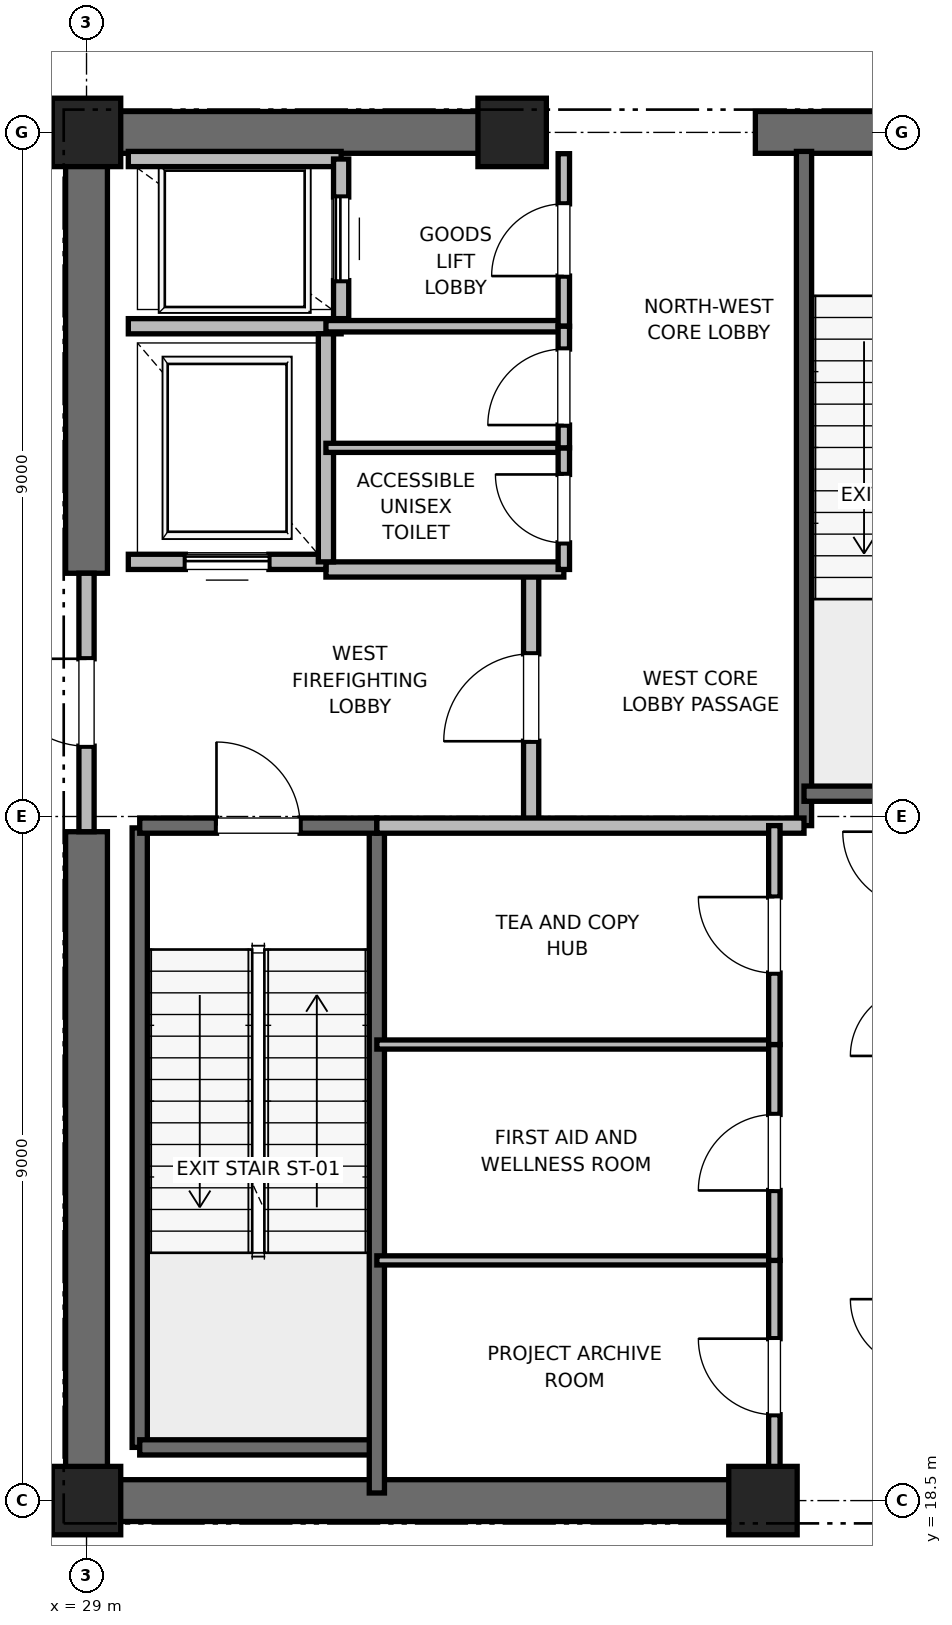
"""IFC4 building model, lengths in metres.
Left out: names, types, materials, properties, quantities, classifications, styles, units other than length and angle.
Written with IfcOpenShell. Run it as: python <this file> out.ifc"""

import sys

from ifc_helpers import new_model, si_unit, direction, frame, frame_2d, origin, origin_2d, place, context, subcontext, project, spatial, rectangle, extrude, element, fill, save


model = new_model("IFC4")
c1 = context("Model", 3, precision=1e-05, world=origin(), true_north=direction((0.0, 1.0)))
c2 = subcontext(c1, "Body", "Model", "MODEL_VIEW")
j1 = project(units=[si_unit("LENGTHUNIT", "METRE"), si_unit("PLANEANGLEUNIT", "RADIAN")], contexts=[c1])
p1 = place(None, origin())
s1 = spatial("IfcSite", under=j1, at=p1, CompositionType="ELEMENT")
p2 = place(p1, origin())
s2 = spatial("IfcBuilding", under=s1, at=p2, CompositionType="ELEMENT")
p3 = place(p2, frame((0.0, 0.0, 184.4)))
s3 = spatial("IfcBuildingStorey", under=s2, at=p3, CompositionType="ELEMENT", Elevation=184.4)
for number, where, z_axis, x_axis in (
    (1, (29.0, 18.5, 0.0), (0.0, 0.0, 1.0), (1.0, 0.0, 0.0)),
    (2, (29.0, 36.5, 0.0), (0.0, 0.0, 1.0), (1.0, 0.0, 0.0)),
    (3, (37.9, 18.5, 0.0), (0.0, 0.0, 1.0), (1.0, 0.0, 0.0)),
    (4, (34.6, 36.5, 0.0), (0.0, 0.0, 1.0), (1.0, 0.0, 0.0)),
):
    element("IfcColumn", number, at=place(p3, frame(where, z_axis=z_axis, x_axis=x_axis)), inside=s3, PredefinedType="PILASTER", context=c2, shape_type="SweptSolid", body=[
        extrude(rectangle(XDim=0.9, YDim=0.9, at=origin_2d()), origin(), (0.0, 0.0, 1.0), 5.0),
    ])
p4 = place(p3, frame((29.0, 18.5, 0.0), z_axis=(0.0, 0.0, 1.0), x_axis=(1.0, 0.0, 0.0)))
e5 = element("IfcWall", 5, at=p4, inside=s3, PredefinedType="SHEAR", context=c2, shape_type="SweptSolid", body=[
    extrude(rectangle(XDim=9.2, YDim=0.55, at=frame_2d((4.6, 0.0))), origin(), (0.0, 0.0, 1.0), 4.7),
])
p5 = place(p3, frame((29.0, 36.5, 0.0), z_axis=(0.0, 0.0, 1.0), x_axis=(1.0, 0.0, 0.0)))
e6 = element("IfcWall", 6, at=p5, inside=s3, PredefinedType="SHEAR", context=c2, shape_type="SweptSolid", body=[
    extrude(rectangle(XDim=5.8, YDim=0.55, at=frame_2d((2.9, 0.0))), origin(), (0.0, 0.0, 1.0), 4.7),
])
p6 = place(p3, frame((37.8, 36.5, 0.0), z_axis=(0.0, 0.0, 1.0), x_axis=(1.0, 0.0, 0.0)))
e7 = element("IfcWall", 7, at=p6, inside=s3, PredefinedType="SHEAR", context=c2, shape_type="SweptSolid", body=[
    extrude(rectangle(XDim=4.4, YDim=0.55, at=frame_2d((2.2, 0.0))), origin(), (0.0, 0.0, 1.0), 4.7),
])
p7 = place(p6, frame((1.65, 0.0, 0.0)))
e8 = element("IfcOpeningElement", 8, at=p7, cuts=e7, PredefinedType="OPENING", context=c2, shape_type="SweptSolid", body=[
    extrude(rectangle(XDim=1.1, YDim=2.15, at=frame_2d((0.55, 1.075))), frame((0.0, 0.275, 0.0), z_axis=(0.0, -1.0, 0.0), x_axis=(1.0, 0.0, 0.0)), (0.0, 0.0, 1.0), 0.55),
])
p8 = place(p3, frame((29.0, 18.5, 0.0), z_axis=(0.0, 0.0, 1.0), x_axis=(0.0, 1.0, 0.0)))
e9 = element("IfcWall", 9, at=p8, inside=s3, PredefinedType="SHEAR", context=c2, shape_type="SweptSolid", body=[
    extrude(rectangle(XDim=8.8, YDim=0.55, at=frame_2d((4.4, 0.0))), origin(), (0.0, 0.0, 1.0), 4.7),
])
p9 = place(p3, frame((29.0, 30.7, 0.0), z_axis=(0.0, 0.0, 1.0), x_axis=(0.0, 1.0, 0.0)))
e10 = element("IfcWall", 10, at=p9, inside=s3, PredefinedType="SHEAR", context=c2, shape_type="SweptSolid", body=[
    extrude(rectangle(XDim=5.8, YDim=0.55, at=frame_2d((2.9, 0.0))), origin(), (0.0, 0.0, 1.0), 4.7),
])
p10 = place(p3, frame((29.7, 19.2, 0.0), z_axis=(0.0, 0.0, 1.0), x_axis=(0.0, 1.0, 0.0)))
e11 = element("IfcWall", 11, at=p10, inside=s3, PredefinedType="SOLIDWALL", context=c2, shape_type="SweptSolid", body=[
    extrude(rectangle(XDim=8.15, YDim=0.2, at=frame_2d((4.075, 0.0))), origin(), (0.0, 0.0, 1.0), 4.7),
])
p11 = place(p3, frame((29.7, 19.2, 0.0), z_axis=(0.0, 0.0, 1.0), x_axis=(1.0, 0.0, 0.0)))
e12 = element("IfcWall", 12, at=p11, inside=s3, PredefinedType="SOLIDWALL", context=c2, shape_type="SweptSolid", body=[
    extrude(rectangle(XDim=3.12, YDim=0.2, at=frame_2d((1.56, 0.0))), origin(), (0.0, 0.0, 1.0), 4.7),
])
p12 = place(p3, frame((32.82, 18.6, 0.0), z_axis=(0.0, 0.0, 1.0), x_axis=(0.0, 1.0, 0.0)))
e13 = element("IfcWall", 13, at=p12, inside=s3, PredefinedType="SOLIDWALL", context=c2, shape_type="SweptSolid", body=[
    extrude(rectangle(XDim=8.78, YDim=0.2, at=frame_2d((4.39, 0.0))), origin(), (0.0, 0.0, 1.0), 4.7),
])
p13 = place(p3, frame((29.7, 27.38, 0.0), z_axis=(0.0, 0.0, 1.0), x_axis=(1.0, 0.0, 0.0)))
e14 = element("IfcWall", 14, at=p13, inside=s3, PredefinedType="SOLIDWALL", context=c2, shape_type="SweptSolid", body=[
    extrude(rectangle(XDim=3.12, YDim=0.2, at=frame_2d((1.56, 0.0))), origin(), (0.0, 0.0, 1.0), 4.7),
])
p14 = place(p13, frame((1.01, 0.0, 0.0)))
e15 = element("IfcOpeningElement", 15, at=p14, cuts=e14, PredefinedType="OPENING", context=c2, shape_type="SweptSolid", body=[
    extrude(rectangle(XDim=1.1, YDim=2.15, at=frame_2d((0.55, 1.075))), frame((0.0, 0.1, 0.0), z_axis=(0.0, -1.0, 0.0), x_axis=(1.0, 0.0, 0.0)), (0.0, 0.0, 1.0), 0.2),
])
p15 = place(p3, frame((38.44, 27.38, 0.0), z_axis=(0.0, 0.0, 1.0), x_axis=(0.0, 1.0, 0.0)))
e16 = element("IfcWall", 16, at=p15, inside=s3, PredefinedType="SOLIDWALL", context=c2, shape_type="SweptSolid", body=[
    extrude(rectangle(XDim=8.87, YDim=0.2, at=frame_2d((4.435, 0.0))), origin(), (0.0, 0.0, 1.0), 4.7),
])
p16 = place(p3, frame((38.44, 27.8, 0.0), z_axis=(0.0, 0.0, 1.0), x_axis=(1.0, 0.0, 0.0)))
e17 = element("IfcWall", 17, at=p16, inside=s3, PredefinedType="SOLIDWALL", context=c2, shape_type="SweptSolid", body=[
    extrude(rectangle(XDim=3.32, YDim=0.2, at=frame_2d((1.66, 0.0))), origin(), (0.0, 0.0, 1.0), 4.7),
])
p17 = place(p3, frame((34.85, 27.38, 0.0), z_axis=(0.0, 0.0, 1.0), x_axis=(0.0, 1.0, 0.0)))
e18 = element("IfcWall", 18, at=p17, inside=s3, PredefinedType="PARTITIONING", context=c2, shape_type="SweptSolid", body=[
    extrude(rectangle(XDim=3.37, YDim=0.2, at=frame_2d((1.685, 0.0))), origin(), (0.0, 0.0, 1.0), 4.7),
])
p18 = place(p17, frame((1.11, 0.0, 0.0)))
e19 = element("IfcOpeningElement", 19, at=p18, cuts=e18, PredefinedType="OPENING", context=c2, shape_type="SweptSolid", body=[
    extrude(rectangle(XDim=1.15, YDim=2.2, at=frame_2d((0.575, 1.1))), frame((0.0, 0.1, 0.0), z_axis=(0.0, -1.0, 0.0), x_axis=(1.0, 0.0, 0.0)), (0.0, 0.0, 1.0), 0.2),
])
p19 = place(p3, frame((29.0, 27.3, 0.0), z_axis=(0.0, 0.0, 1.0), x_axis=(0.0, 1.0, 0.0)))
e20 = element("IfcWall", 20, at=p19, inside=s3, PredefinedType="PARTITIONING", context=c2, shape_type="SweptSolid", body=[
    extrude(rectangle(XDim=3.4, YDim=0.2, at=frame_2d((1.7, 0.0))), origin(), (0.0, 0.0, 1.0), 3.68),
])
p20 = place(p19, frame((1.125, 0.0, 0.0)))
e21 = element("IfcOpeningElement", 21, at=p20, cuts=e20, PredefinedType="OPENING", context=c2, shape_type="SweptSolid", body=[
    extrude(rectangle(XDim=1.15, YDim=2.2, at=frame_2d((0.575, 1.1))), frame((0.0, 0.1, 0.0), z_axis=(0.0, -1.0, 0.0), x_axis=(1.0, 0.0, 0.0)), (0.0, 0.0, 1.0), 0.2),
])
p21 = place(p3, frame((32.82, 27.38, 0.0), z_axis=(0.0, 0.0, 1.0), x_axis=(1.0, 0.0, 0.0)))
e22 = element("IfcWall", 22, at=p21, inside=s3, PredefinedType="PARTITIONING", context=c2, shape_type="SweptSolid", body=[
    extrude(rectangle(XDim=5.62, YDim=0.2, at=frame_2d((2.81, 0.0))), origin(), (0.0, 0.0, 1.0), 4.7),
])
p22 = place(p3, frame((32.15, 30.75, 0.0), z_axis=(0.0, 0.0, 1.0), x_axis=(1.0, 0.0, 0.0)))
e23 = element("IfcWall", 23, at=p22, inside=s3, PredefinedType="PARTITIONING", context=c2, shape_type="SweptSolid", body=[
    extrude(rectangle(XDim=3.13, YDim=0.2, at=frame_2d((1.565, 0.0))), origin(), (0.0, 0.0, 1.0), 4.7),
])
p23 = place(p3, frame((29.55, 30.85, 0.0), z_axis=(0.0, 0.0, 1.0), x_axis=(1.0, 0.0, 0.0)))
e24 = element("IfcWall", 24, at=p23, inside=s3, PredefinedType="SOLIDWALL", context=c2, shape_type="SweptSolid", body=[
    extrude(rectangle(XDim=2.6, YDim=0.2, at=frame_2d((1.3, 0.0))), origin(), (0.0, 0.0, 1.0), 3.68),
])
p24 = place(p23, frame((0.75, 0.0, 0.0)))
e25 = element("IfcOpeningElement", 25, at=p24, cuts=e24, PredefinedType="OPENING", context=c2, shape_type="SweptSolid", body=[
    extrude(rectangle(XDim=1.1, YDim=2.2, at=frame_2d((0.55, 1.1))), frame((0.0, 0.1, 0.0), z_axis=(0.0, -1.0, 0.0), x_axis=(1.0, 0.0, 0.0)), (0.0, 0.0, 1.0), 0.2),
])
p25 = place(p3, frame((29.55, 33.95, 0.0), z_axis=(0.0, 0.0, 1.0), x_axis=(1.0, 0.0, 0.0)))
e26 = element("IfcWall", 26, at=p25, inside=s3, PredefinedType="SOLIDWALL", context=c2, shape_type="SweptSolid", body=[
    extrude(rectangle(XDim=2.8, YDim=0.2, at=frame_2d((1.4, 0.0))), origin(), (0.0, 0.0, 1.0), 4.7),
])
p26 = place(p3, frame((32.15, 30.85, 0.0), z_axis=(0.0, 0.0, 1.0), x_axis=(0.0, 1.0, 0.0)))
e27 = element("IfcWall", 27, at=p26, inside=s3, PredefinedType="SOLIDWALL", context=c2, shape_type="SweptSolid", body=[
    extrude(rectangle(XDim=3.0, YDim=0.2, at=frame_2d((1.5, 0.0))), origin(), (0.0, 0.0, 1.0), 4.7),
])
p27 = place(p3, frame((32.35, 36.15, 0.0), z_axis=(0.0, 0.0, 1.0), x_axis=(-1.0, 0.0, 0.0)))
e28 = element("IfcWall", 28, at=p27, inside=s3, PredefinedType="SOLIDWALL", context=c2, shape_type="SweptSolid", body=[
    extrude(rectangle(XDim=2.8, YDim=0.2, at=frame_2d((1.4, 0.0))), origin(), (0.0, 0.0, 1.0), 3.753),
])
p28 = place(p3, frame((32.35, 34.05, 0.0), z_axis=(0.0, 0.0, 1.0), x_axis=(0.0, 1.0, 0.0)))
e29 = element("IfcWall", 29, at=p28, inside=s3, PredefinedType="SOLIDWALL", context=c2, shape_type="SweptSolid", body=[
    extrude(rectangle(XDim=2.1, YDim=0.2, at=frame_2d((1.05, 0.0))), origin(), (0.0, 0.0, 1.0), 4.7),
])
p29 = place(p28, frame((0.5, 0.0, 0.0)))
e30 = element("IfcOpeningElement", 30, at=p29, cuts=e29, PredefinedType="OPENING", context=c2, shape_type="SweptSolid", body=[
    extrude(rectangle(XDim=1.1, YDim=2.2, at=frame_2d((0.55, 1.1))), frame((0.0, 0.1, 0.0), z_axis=(0.0, -1.0, 0.0), x_axis=(1.0, 0.0, 0.0)), (0.0, 0.0, 1.0), 0.2),
])
p30 = place(p3, frame((32.15, 33.95, 0.0), z_axis=(0.0, 0.0, 1.0), x_axis=(1.0, 0.0, 0.0)))
e31 = element("IfcWall", 31, at=p30, inside=s3, PredefinedType="PARTITIONING", context=c2, shape_type="SweptSolid", body=[
    extrude(rectangle(XDim=3.13, YDim=0.15, at=frame_2d((1.565, 0.0))), origin(), (0.0, 0.0, 1.0), 2.85),
])
p31 = place(p3, frame((35.28, 33.95, 0.0), z_axis=(0.0, 0.0, 1.0), x_axis=(0.0, 1.0, 0.0)))
e32 = element("IfcWall", 32, at=p31, inside=s3, PredefinedType="PARTITIONING", context=c2, shape_type="SweptSolid", body=[
    extrude(rectangle(XDim=2.27, YDim=0.15, at=frame_2d((1.135, 0.0))), origin(), (0.0, 0.0, 1.0), 2.85),
])
p32 = place(p31, frame((0.66, 0.0, 0.0)))
e33 = element("IfcOpeningElement", 33, at=p32, cuts=e32, PredefinedType="OPENING", context=c2, shape_type="SweptSolid", body=[
    extrude(rectangle(XDim=0.95, YDim=2.15, at=frame_2d((0.475, 1.075))), frame((0.0, 0.075, 0.0), z_axis=(0.0, -1.0, 0.0), x_axis=(1.0, 0.0, 0.0)), (0.0, 0.0, 1.0), 0.15),
])
p33 = place(p3, frame((32.15, 32.35, 0.0), z_axis=(0.0, 0.0, 1.0), x_axis=(1.0, 0.0, 0.0)))
e34 = element("IfcWall", 34, at=p33, inside=s3, PredefinedType="PARTITIONING", context=c2, shape_type="SweptSolid", body=[
    extrude(rectangle(XDim=3.13, YDim=0.12, at=frame_2d((1.565, 0.0))), origin(), (0.0, 0.0, 1.0), 2.85),
])
p34 = place(p3, frame((35.28, 30.75, 0.0), z_axis=(0.0, 0.0, 1.0), x_axis=(0.0, 1.0, 0.0)))
e35 = element("IfcWall", 35, at=p34, inside=s3, PredefinedType="PARTITIONING", context=c2, shape_type="SweptSolid", body=[
    extrude(rectangle(XDim=1.6, YDim=0.15, at=frame_2d((0.8, 0.0))), origin(), (0.0, 0.0, 1.0), 2.85),
])
p35 = place(p34, frame((0.35, 0.0, 0.0)))
e36 = element("IfcOpeningElement", 36, at=p35, cuts=e35, PredefinedType="OPENING", context=c2, shape_type="SweptSolid", body=[
    extrude(rectangle(XDim=0.9, YDim=2.1, at=frame_2d((0.45, 1.05))), frame((0.0, 0.075, 0.0), z_axis=(0.0, -1.0, 0.0), x_axis=(1.0, 0.0, 0.0)), (0.0, 0.0, 1.0), 0.15),
])
p36 = place(p3, frame((35.28, 32.35, 0.0), z_axis=(0.0, 0.0, 1.0), x_axis=(0.0, 1.0, 0.0)))
e37 = element("IfcWall", 37, at=p36, inside=s3, PredefinedType="PARTITIONING", context=c2, shape_type="SweptSolid", body=[
    extrude(rectangle(XDim=1.6, YDim=0.15, at=frame_2d((0.8, 0.0))), origin(), (0.0, 0.0, 1.0), 2.85),
])
p37 = place(p36, frame((0.3, 0.0, 0.0)))
e38 = element("IfcOpeningElement", 38, at=p37, cuts=e37, PredefinedType="OPENING", context=c2, shape_type="SweptSolid", body=[
    extrude(rectangle(XDim=1.0, YDim=2.15, at=frame_2d((0.5, 1.075))), frame((0.0, 0.075, 0.0), z_axis=(0.0, -1.0, 0.0), x_axis=(1.0, 0.0, 0.0)), (0.0, 0.0, 1.0), 0.15),
])
for number, where, z_axis, x_axis in (
    (39, (32.82, 21.66, 0.0), (0.0, 0.0, 1.0), (1.0, 0.0, 0.0)),
    (40, (32.82, 24.5, 0.0), (0.0, 0.0, 1.0), (1.0, 0.0, 0.0)),
):
    element("IfcWall", number, at=place(p3, frame(where, z_axis=z_axis, x_axis=x_axis)), inside=s3, PredefinedType="PARTITIONING", context=c2, shape_type="SweptSolid", body=[
        extrude(rectangle(XDim=5.23, YDim=0.12, at=frame_2d((2.615, 0.0))), origin(), (0.0, 0.0, 1.0), 2.85),
    ])
p38 = place(p3, frame((38.05, 18.6, 0.0), z_axis=(0.0, 0.0, 1.0), x_axis=(0.0, 1.0, 0.0)))
e41 = element("IfcWall", 41, at=p38, inside=s3, PredefinedType="PARTITIONING", context=c2, shape_type="SweptSolid", body=[
    extrude(rectangle(XDim=3.06, YDim=0.15, at=frame_2d((1.53, 0.0))), origin(), (0.0, 0.0, 1.0), 2.85),
])
p39 = place(p38, frame((1.03, 0.0, 0.0)))
e42 = element("IfcOpeningElement", 42, at=p39, cuts=e41, PredefinedType="OPENING", context=c2, shape_type="SweptSolid", body=[
    extrude(rectangle(XDim=1.0, YDim=2.15, at=frame_2d((0.5, 1.075))), frame((0.0, 0.075, 0.0), z_axis=(0.0, -1.0, 0.0), x_axis=(1.0, 0.0, 0.0)), (0.0, 0.0, 1.0), 0.15),
])
p40 = place(p3, frame((38.05, 21.66, 0.0), z_axis=(0.0, 0.0, 1.0), x_axis=(0.0, 1.0, 0.0)))
e43 = element("IfcWall", 43, at=p40, inside=s3, PredefinedType="PARTITIONING", context=c2, shape_type="SweptSolid", body=[
    extrude(rectangle(XDim=2.84, YDim=0.15, at=frame_2d((1.42, 0.0))), origin(), (0.0, 0.0, 1.0), 2.85),
])
p41 = place(p40, frame((0.92, 0.0, 0.0)))
e44 = element("IfcOpeningElement", 44, at=p41, cuts=e43, PredefinedType="OPENING", context=c2, shape_type="SweptSolid", body=[
    extrude(rectangle(XDim=1.0, YDim=2.15, at=frame_2d((0.5, 1.075))), frame((0.0, 0.075, 0.0), z_axis=(0.0, -1.0, 0.0), x_axis=(1.0, 0.0, 0.0)), (0.0, 0.0, 1.0), 0.15),
])
p42 = place(p3, frame((38.05, 24.5, 0.0), z_axis=(0.0, 0.0, 1.0), x_axis=(0.0, 1.0, 0.0)))
e45 = element("IfcWall", 45, at=p42, inside=s3, PredefinedType="PARTITIONING", context=c2, shape_type="SweptSolid", body=[
    extrude(rectangle(XDim=2.88, YDim=0.15, at=frame_2d((1.44, 0.0))), origin(), (0.0, 0.0, 1.0), 2.85),
])
p43 = place(p42, frame((0.94, 0.0, 0.0)))
e46 = element("IfcOpeningElement", 46, at=p43, cuts=e45, PredefinedType="OPENING", context=c2, shape_type="SweptSolid", body=[
    extrude(rectangle(XDim=1.0, YDim=2.15, at=frame_2d((0.5, 1.075))), frame((0.0, 0.075, 0.0), z_axis=(0.0, -1.0, 0.0), x_axis=(1.0, 0.0, 0.0)), (0.0, 0.0, 1.0), 0.15),
])
p44 = place(p14, origin())
e47 = element("IfcDoor", 47, at=p44, inside=s3, OperationType="SINGLE_SWING_LEFT", PredefinedType="DOOR", context=c2, shape_type="SweptSolid", body=[
    extrude(rectangle(XDim=1.1, YDim=2.15, at=frame_2d((0.55, 1.075))), frame((0.0, 0.025, 0.0), z_axis=(0.0, -1.0, 0.0), x_axis=(1.0, 0.0, 0.0)), (0.0, 0.0, 1.0), 0.05),
])
fill(e15, e47)
p45 = place(p18, origin())
e48 = element("IfcDoor", 48, at=p45, inside=s3, OperationType="SINGLE_SWING_LEFT", PredefinedType="DOOR", context=c2, shape_type="SweptSolid", body=[
    extrude(rectangle(XDim=1.15, YDim=2.2, at=frame_2d((0.575, 1.1))), frame((0.0, 0.025, 0.0), z_axis=(0.0, -1.0, 0.0), x_axis=(1.0, 0.0, 0.0)), (0.0, 0.0, 1.0), 0.05),
])
fill(e19, e48)
p46 = place(p20, origin())
e49 = element("IfcDoor", 49, at=p46, inside=s3, OperationType="SINGLE_SWING_RIGHT", PredefinedType="DOOR", context=c2, shape_type="SweptSolid", body=[
    extrude(rectangle(XDim=1.15, YDim=2.2, at=frame_2d((0.575, 1.1))), frame((0.0, 0.025, 0.0), z_axis=(0.0, -1.0, 0.0), x_axis=(1.0, 0.0, 0.0)), (0.0, 0.0, 1.0), 0.05),
])
fill(e21, e49)
p47 = place(p24, origin())
e50 = element("IfcDoor", 50, at=p47, inside=s3, OperationType="SLIDING_TO_RIGHT", PredefinedType="DOOR", context=c2, shape_type="SweptSolid", body=[
    extrude(rectangle(XDim=1.1, YDim=2.2, at=frame_2d((0.55, 1.1))), frame((0.0, 0.025, 0.0), z_axis=(0.0, -1.0, 0.0), x_axis=(1.0, 0.0, 0.0)), (0.0, 0.0, 1.0), 0.05),
])
fill(e25, e50)
p48 = place(p29, origin())
e51 = element("IfcDoor", 51, at=p48, inside=s3, OperationType="SLIDING_TO_RIGHT", PredefinedType="DOOR", context=c2, shape_type="SweptSolid", body=[
    extrude(rectangle(XDim=1.1, YDim=2.2, at=frame_2d((0.55, 1.1))), frame((0.0, 0.025, 0.0), z_axis=(0.0, -1.0, 0.0), x_axis=(1.0, 0.0, 0.0)), (0.0, 0.0, 1.0), 0.05),
])
fill(e30, e51)
p49 = place(p32, origin())
e52 = element("IfcDoor", 52, at=p49, inside=s3, OperationType="SINGLE_SWING_LEFT", PredefinedType="DOOR", context=c2, shape_type="SweptSolid", body=[
    extrude(rectangle(XDim=0.95, YDim=2.15, at=frame_2d((0.475, 1.075))), frame((0.0, 0.025, 0.0), z_axis=(0.0, -1.0, 0.0), x_axis=(1.0, 0.0, 0.0)), (0.0, 0.0, 1.0), 0.05),
])
fill(e33, e52)
p50 = place(p35, origin())
e53 = element("IfcDoor", 53, at=p50, inside=s3, OperationType="SINGLE_SWING_RIGHT", PredefinedType="DOOR", context=c2, shape_type="SweptSolid", body=[
    extrude(rectangle(XDim=0.9, YDim=2.1, at=frame_2d((0.45, 1.05))), frame((0.0, 0.025, 0.0), z_axis=(0.0, -1.0, 0.0), x_axis=(1.0, 0.0, 0.0)), (0.0, 0.0, 1.0), 0.05),
])
fill(e36, e53)
p51 = place(p37, origin())
e54 = element("IfcDoor", 54, at=p51, inside=s3, OperationType="SINGLE_SWING_LEFT", PredefinedType="DOOR", context=c2, shape_type="SweptSolid", body=[
    extrude(rectangle(XDim=1.0, YDim=2.15, at=frame_2d((0.5, 1.075))), frame((0.0, 0.025, 0.0), z_axis=(0.0, -1.0, 0.0), x_axis=(1.0, 0.0, 0.0)), (0.0, 0.0, 1.0), 0.05),
])
fill(e38, e54)
p52 = place(p39, origin())
e55 = element("IfcDoor", 55, at=p52, inside=s3, OperationType="SINGLE_SWING_RIGHT", PredefinedType="DOOR", context=c2, shape_type="SweptSolid", body=[
    extrude(rectangle(XDim=1.0, YDim=2.15, at=frame_2d((0.5, 1.075))), frame((0.0, 0.025, 0.0), z_axis=(0.0, -1.0, 0.0), x_axis=(1.0, 0.0, 0.0)), (0.0, 0.0, 1.0), 0.05),
])
fill(e42, e55)
p53 = place(p41, origin())
e56 = element("IfcDoor", 56, at=p53, inside=s3, OperationType="SINGLE_SWING_LEFT", PredefinedType="DOOR", context=c2, shape_type="SweptSolid", body=[
    extrude(rectangle(XDim=1.0, YDim=2.15, at=frame_2d((0.5, 1.075))), frame((0.0, 0.025, 0.0), z_axis=(0.0, -1.0, 0.0), x_axis=(1.0, 0.0, 0.0)), (0.0, 0.0, 1.0), 0.05),
])
fill(e44, e56)
p54 = place(p43, origin())
e57 = element("IfcDoor", 57, at=p54, inside=s3, OperationType="SINGLE_SWING_RIGHT", PredefinedType="DOOR", context=c2, shape_type="SweptSolid", body=[
    extrude(rectangle(XDim=1.0, YDim=2.15, at=frame_2d((0.5, 1.075))), frame((0.0, 0.025, 0.0), z_axis=(0.0, -1.0, 0.0), x_axis=(1.0, 0.0, 0.0)), (0.0, 0.0, 1.0), 0.05),
])
fill(e46, e57)
save(model, sys.argv[1])
